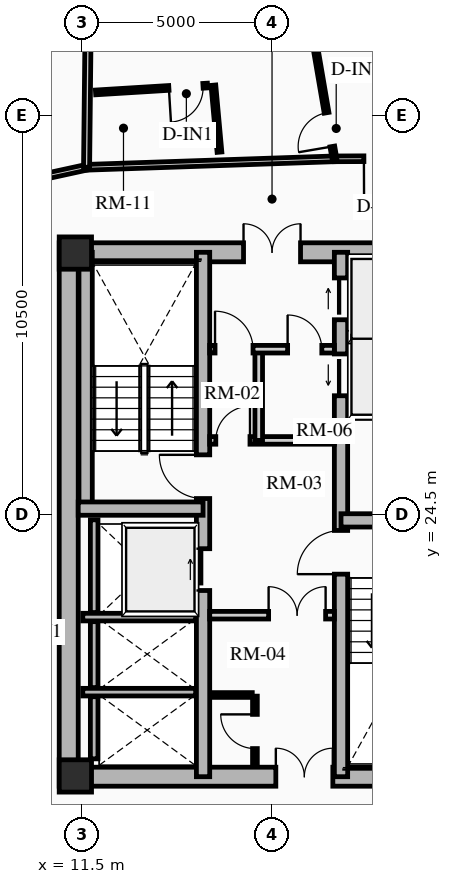
"""IFC4 building model, lengths in metres.
Left out: names, types, materials, properties, quantities, classifications, styles, units other than length and angle.
Written with IfcOpenShell. Run it as: python <this file> out.ifc"""

import sys

from ifc_helpers import new_model, si_unit, direction, frame, frame_2d, origin, origin_2d, place, context, subcontext, project, spatial, rectangle, extrude, source, transform, mapped, element, fill, save


model = new_model("IFC4")
c1 = context("Model", 3, precision=1e-05, world=origin(), true_north=direction((0.0, 1.0)))
c2 = subcontext(c1, "Body", "Model", "MODEL_VIEW")
j1 = project(units=[si_unit("LENGTHUNIT", "METRE"), si_unit("PLANEANGLEUNIT", "RADIAN")], contexts=[c1])
p1 = place(None, origin())
s1 = spatial("IfcSite", under=j1, at=p1, CompositionType="ELEMENT")
p2 = place(p1, origin())
s2 = spatial("IfcBuilding", under=s1, at=p2, CompositionType="ELEMENT")
p3 = place(p2, frame((0.0, 0.0, 39.46)))
s3 = spatial("IfcBuildingStorey", under=s2, at=p3, CompositionType="ELEMENT", Elevation=39.46)
p4 = place(p3, frame((11.15, 17.35, 0.0), z_axis=(0.0, 0.0, 1.0), x_axis=(0.0, 1.0, 0.0)))
e1 = element("IfcWall", 1, at=p4, inside=s3, PredefinedType="SHEAR", context=c2, shape_type="SweptSolid", body=[
    extrude(rectangle(XDim=14.3, YDim=0.5, at=frame_2d((7.15, 0.0))), origin(), (0.0, 0.0, 1.0), 2.91),
])
p5 = place(p3, frame((11.15, 17.6, 0.0), z_axis=(0.0, 0.0, 1.0), x_axis=(1.0, 0.0, 0.0)))
e2 = element("IfcWall", 2, at=p5, inside=s3, PredefinedType="SHEAR", context=c2, shape_type="SweptSolid", body=[
    extrude(rectangle(XDim=10.7, YDim=0.5, at=frame_2d((5.35, 0.0))), origin(), (0.0, 0.0, 1.0), 2.91),
])
m1 = source(origin(), c2, "Body", "SweptSolid", [
    extrude(rectangle(XDim=1.5, YDim=2.02, at=frame_2d((0.75, 1.01))), frame((0.0, 0.26, 0.0), z_axis=(0.0, -1.0, 0.0), x_axis=(1.0, 0.0, 0.0)), (0.0, 0.0, 1.0), 0.52),
])
p6 = place(p5, frame((5.45, 0.0, 0.0)))
e3 = element("IfcOpeningElement", 3, at=p6, cuts=e2, PredefinedType="OPENING", context=c2, shape_type="MappedRepresentation", body=[
    mapped(m1, transform((0.0, 0.0, 0.0), x_axis=(1.0, 0.0, 0.0), y_axis=(0.0, 1.0, 0.0), z_axis=(0.0, 0.0, 1.0), scale=1.0)),
])
p7 = place(p3, frame((11.15, 31.4, 0.0), z_axis=(0.0, 0.0, 1.0), x_axis=(1.0, 0.0, 0.0)))
e4 = element("IfcWall", 4, at=p7, inside=s3, PredefinedType="SHEAR", context=c2, shape_type="SweptSolid", body=[
    extrude(rectangle(XDim=10.7, YDim=0.5, at=frame_2d((5.35, 0.0))), origin(), (0.0, 0.0, 1.0), 2.91),
])
p8 = place(p7, frame((4.6, 0.0, 0.0)))
e5 = element("IfcOpeningElement", 5, at=p8, cuts=e4, PredefinedType="OPENING", context=c2, shape_type="MappedRepresentation", body=[
    mapped(m1, transform((0.0, 0.0, 0.0), x_axis=(1.0, 0.0, 0.0), y_axis=(0.0, 1.0, 0.0), z_axis=(0.0, 0.0, 1.0), scale=1.0)),
])
p9 = place(p3, frame((14.685, 17.6, 0.0), z_axis=(0.0, 0.0, 1.0), x_axis=(0.0, 1.0, 0.0)))
e6 = element("IfcWall", 6, at=p9, inside=s3, PredefinedType="SHEAR", context=c2, shape_type="SweptSolid", body=[
    extrude(rectangle(XDim=13.8, YDim=0.35, at=frame_2d((6.9, 0.0))), origin(), (0.0, 0.0, 1.0), 2.91),
])
m2 = source(origin(), c2, "Body", "SweptSolid", [
    extrude(rectangle(XDim=1.1, YDim=2.015, at=frame_2d((0.55, 1.007))), frame((0.0, 0.185, 0.0), z_axis=(0.0, -1.0, 0.0), x_axis=(1.0, 0.0, 0.0)), (0.0, 0.0, 1.0), 0.37),
])
p10 = place(p9, frame((4.9, 0.0, 0.0)))
e7 = element("IfcOpeningElement", 7, at=p10, cuts=e6, PredefinedType="OPENING", context=c2, shape_type="MappedRepresentation", body=[
    mapped(m2, transform((0.0, 0.0, 0.0), x_axis=(1.0, 0.0, 0.0), y_axis=(0.0, 1.0, 0.0), z_axis=(0.0, 0.0, 1.0), scale=1.0)),
])
m3 = source(origin(), c2, "Body", "SweptSolid", [
    extrude(rectangle(XDim=1.15, YDim=2.02, at=frame_2d((0.575, 1.01))), frame((0.0, 0.185, 0.0), z_axis=(0.0, -1.0, 0.0), x_axis=(1.0, 0.0, 0.0)), (0.0, 0.0, 1.0), 0.37),
])
p11 = place(p9, frame((7.32, 0.0, 0.0)))
e8 = element("IfcOpeningElement", 8, at=p11, cuts=e6, PredefinedType="OPENING", context=c2, shape_type="MappedRepresentation", body=[
    mapped(m3, transform((0.0, 0.0, 0.0), x_axis=(1.0, 0.0, 0.0), y_axis=(0.0, 1.0, 0.0), z_axis=(0.0, 0.0, 1.0), scale=1.0)),
])
p12 = place(p3, frame((18.315, 17.6, 0.0), z_axis=(0.0, 0.0, 1.0), x_axis=(0.0, 1.0, 0.0)))
e9 = element("IfcWall", 9, at=p12, inside=s3, PredefinedType="SHEAR", context=c2, shape_type="SweptSolid", body=[
    extrude(rectangle(XDim=13.8, YDim=0.35, at=frame_2d((6.9, 0.0))), origin(), (0.0, 0.0, 1.0), 2.91),
])
p13 = place(p12, frame((10.025, 0.0, 0.0)))
e10 = element("IfcOpeningElement", 10, at=p13, cuts=e9, PredefinedType="OPENING", context=c2, shape_type="MappedRepresentation", body=[
    mapped(m2, transform((0.0, 0.0, 0.0), x_axis=(1.0, 0.0, 0.0), y_axis=(0.0, 1.0, 0.0), z_axis=(0.0, 0.0, 1.0), scale=1.0)),
])
p14 = place(p12, frame((12.025, 0.0, 0.0)))
e11 = element("IfcOpeningElement", 11, at=p14, cuts=e9, PredefinedType="OPENING", context=c2, shape_type="MappedRepresentation", body=[
    mapped(m2, transform((0.0, 0.0, 0.0), x_axis=(1.0, 0.0, 0.0), y_axis=(0.0, 1.0, 0.0), z_axis=(0.0, 0.0, 1.0), scale=1.0)),
])
p15 = place(p12, frame((5.33, 0.0, 0.0)))
e12 = element("IfcOpeningElement", 12, at=p15, cuts=e9, PredefinedType="OPENING", context=c2, shape_type="MappedRepresentation", body=[
    mapped(m3, transform((0.0, 0.0, 0.0), x_axis=(1.0, 0.0, 0.0), y_axis=(0.0, 1.0, 0.0), z_axis=(0.0, 0.0, 1.0), scale=1.0)),
])
p16 = place(p3, frame((11.595, 24.655, 0.0), z_axis=(0.0, 0.0, 1.0), x_axis=(0.0, 1.0, 0.0)))
e13 = element("IfcWall", 13, at=p16, inside=s3, PredefinedType="SHEAR", context=c2, shape_type="SweptSolid", body=[
    extrude(rectangle(XDim=6.745, YDim=0.35, at=frame_2d((3.373, 0.0))), origin(), (0.0, 0.0, 1.0), 2.91),
])
for number, where, z_axis, x_axis in (
    (14, (11.4, 24.655, 0.0), (0.0, 0.0, 1.0), (1.0, 0.0, 0.0)),
    (15, (18.315, 24.345, 0.0), (0.0, 0.0, 1.0), (1.0, 0.0, 0.0)),
):
    element("IfcWall", number, at=place(p3, frame(where, z_axis=z_axis, x_axis=x_axis)), inside=s3, PredefinedType="SHEAR", context=c2, shape_type="SweptSolid", body=[
        extrude(rectangle(XDim=3.285, YDim=0.35, at=frame_2d((1.643, 0.0))), origin(), (0.0, 0.0, 1.0), 2.91),
    ])
for number, where, z_axis, x_axis in (
    (16, (11.325, 17.62, 0.0), (0.0, 0.0, 1.0), (1.0, 0.0, 0.0)),
    (17, (11.325, 31.38, 0.0), (0.0, 0.0, 1.0), (1.0, 0.0, 0.0)),
):
    element("IfcColumn", number, at=place(p3, frame(where, z_axis=z_axis, x_axis=x_axis)), inside=s3, PredefinedType="COLUMN", context=c2, shape_type="SweptSolid", body=[
        extrude(rectangle(XDim=0.85, YDim=0.85, at=origin_2d()), origin(), (0.0, 0.0, 1.0), 2.91),
    ])
p17 = place(p3, frame((11.52, 21.8, 0.0), z_axis=(0.0, 0.0, 1.0), x_axis=(1.0, 0.0, 0.0)))
e18 = element("IfcWall", 18, at=p17, inside=s3, PredefinedType="SHEAR", context=c2, shape_type="SweptSolid", body=[
    extrude(rectangle(XDim=2.97, YDim=0.2, at=frame_2d((1.485, 0.0))), origin(), (0.0, 0.0, 1.0), 2.91),
])
p18 = place(p3, frame((11.82, 21.92, 0.0), z_axis=(0.0, 0.0, 1.0), x_axis=(0.0, 1.0, 0.0)))
e19 = element("IfcWall", 19, at=p18, inside=s3, PredefinedType="SHEAR", context=c2, shape_type="SweptSolid", body=[
    extrude(rectangle(XDim=2.44, YDim=0.2, at=frame_2d((1.22, 0.0))), origin(), (0.0, 0.0, 1.0), 2.91),
])
p19 = place(p3, frame((11.52, 19.825, 0.0), z_axis=(0.0, 0.0, 1.0), x_axis=(1.0, 0.0, 0.0)))
e20 = element("IfcWall", 20, at=p19, inside=s3, PredefinedType="SHEAR", context=c2, shape_type="SweptSolid", body=[
    extrude(rectangle(XDim=2.97, YDim=0.2, at=frame_2d((1.485, 0.0))), origin(), (0.0, 0.0, 1.0), 2.91),
])
p20 = place(p3, frame((11.82, 19.945, 0.0), z_axis=(0.0, 0.0, 1.0), x_axis=(0.0, 1.0, 0.0)))
e21 = element("IfcWall", 21, at=p20, inside=s3, PredefinedType="SHEAR", context=c2, shape_type="SweptSolid", body=[
    extrude(rectangle(XDim=1.735, YDim=0.2, at=frame_2d((0.867, 0.0))), origin(), (0.0, 0.0, 1.0), 2.91),
])
p21 = place(p3, frame((11.82, 18.07, 0.0), z_axis=(0.0, 0.0, 1.0), x_axis=(0.0, 1.0, 0.0)))
e22 = element("IfcWall", 22, at=p21, inside=s3, PredefinedType="SHEAR", context=c2, shape_type="SweptSolid", body=[
    extrude(rectangle(XDim=1.635, YDim=0.2, at=frame_2d((0.817, 0.0))), origin(), (0.0, 0.0, 1.0), 2.91),
])
for number, where, z_axis, x_axis in (
    (23, (18.51, 27.13, 0.0), (0.0, 0.0, 1.0), (1.0, 0.0, 0.0)),
    (24, (18.51, 29.175, 0.0), (0.0, 0.0, 1.0), (1.0, 0.0, 0.0)),
):
    element("IfcWall", number, at=place(p3, frame(where, z_axis=z_axis, x_axis=x_axis)), inside=s3, PredefinedType="SHEAR", context=c2, shape_type="SweptSolid", body=[
        extrude(rectangle(XDim=2.97, YDim=0.2, at=frame_2d((1.485, 0.0))), origin(), (0.0, 0.0, 1.0), 2.91),
    ])
p22 = place(p3, frame((14.86, 21.85, 0.0), z_axis=(0.0, 0.0, 1.0), x_axis=(1.0, 0.0, 0.0)))
e25 = element("IfcWall", 25, at=p22, inside=s3, PredefinedType="PARTITIONING", context=c2, shape_type="SweptSolid", body=[
    extrude(rectangle(XDim=3.28, YDim=0.2, at=frame_2d((1.64, 0.0))), origin(), (0.0, 0.0, 1.0), 2.635),
])
m4 = source(origin(), c2, "Body", "SweptSolid", [
    extrude(rectangle(XDim=1.5, YDim=2.02, at=frame_2d((0.75, 1.01))), frame((0.0, 0.11, 0.0), z_axis=(0.0, -1.0, 0.0), x_axis=(1.0, 0.0, 0.0)), (0.0, 0.0, 1.0), 0.22),
])
p23 = place(p22, frame((1.55, 0.0, 0.0)))
e26 = element("IfcOpeningElement", 26, at=p23, cuts=e25, PredefinedType="OPENING", context=c2, shape_type="MappedRepresentation", body=[
    mapped(m4, transform((0.0, 0.0, 0.0), x_axis=(1.0, 0.0, 0.0), y_axis=(0.0, 1.0, 0.0), z_axis=(0.0, 0.0, 1.0), scale=1.0)),
])
p24 = place(p3, frame((14.86, 26.45, 0.0), z_axis=(0.0, 0.0, 1.0), x_axis=(1.0, 0.0, 0.0)))
e27 = element("IfcWall", 27, at=p24, inside=s3, PredefinedType="PARTITIONING", context=c2, shape_type="SweptSolid", body=[
    extrude(rectangle(XDim=3.28, YDim=0.2, at=frame_2d((1.64, 0.0))), origin(), (0.0, 0.0, 1.0), 2.635),
])
m5 = source(origin(), c2, "Body", "SweptSolid", [
    extrude(rectangle(XDim=0.9, YDim=2.005, at=frame_2d((0.45, 1.002))), frame((0.0, 0.11, 0.0), z_axis=(0.0, -1.0, 0.0), x_axis=(1.0, 0.0, 0.0)), (0.0, 0.0, 1.0), 0.22),
])
p25 = place(p24, frame((0.16, 0.0, 0.0)))
e28 = element("IfcOpeningElement", 28, at=p25, cuts=e27, PredefinedType="OPENING", context=c2, shape_type="MappedRepresentation", body=[
    mapped(m5, transform((0.0, 0.0, 0.0), x_axis=(1.0, 0.0, 0.0), y_axis=(0.0, 1.0, 0.0), z_axis=(0.0, 0.0, 1.0), scale=1.0)),
])
p26 = place(p3, frame((16.15, 26.45, 0.0), z_axis=(0.0, 0.0, 1.0), x_axis=(0.0, 1.0, 0.0)))
e29 = element("IfcWall", 29, at=p26, inside=s3, PredefinedType="PARTITIONING", context=c2, shape_type="SweptSolid", body=[
    extrude(rectangle(XDim=2.4, YDim=0.2, at=frame_2d((1.2, 0.0))), origin(), (0.0, 0.0, 1.0), 2.635),
])
p27 = place(p3, frame((14.86, 28.85, 0.0), z_axis=(0.0, 0.0, 1.0), x_axis=(1.0, 0.0, 0.0)))
e30 = element("IfcWall", 30, at=p27, inside=s3, PredefinedType="PARTITIONING", context=c2, shape_type="SweptSolid", body=[
    extrude(rectangle(XDim=3.28, YDim=0.2, at=frame_2d((1.64, 0.0))), origin(), (0.0, 0.0, 1.0), 2.635),
])
m6 = source(origin(), c2, "Body", "SweptSolid", [
    extrude(rectangle(XDim=1.0, YDim=2.015, at=frame_2d((0.5, 1.007))), frame((0.0, 0.11, 0.0), z_axis=(0.0, -1.0, 0.0), x_axis=(1.0, 0.0, 0.0)), (0.0, 0.0, 1.0), 0.22),
])
p28 = place(p27, frame((0.14, 0.0, 0.0)))
e31 = element("IfcOpeningElement", 31, at=p28, cuts=e30, PredefinedType="OPENING", context=c2, shape_type="MappedRepresentation", body=[
    mapped(m6, transform((0.0, 0.0, 0.0), x_axis=(1.0, 0.0, 0.0), y_axis=(0.0, 1.0, 0.0), z_axis=(0.0, 0.0, 1.0), scale=1.0)),
])
p29 = place(p27, frame((2.05, 0.0, 0.0)))
e32 = element("IfcOpeningElement", 32, at=p29, cuts=e30, PredefinedType="OPENING", context=c2, shape_type="MappedRepresentation", body=[
    mapped(m5, transform((0.0, 0.0, 0.0), x_axis=(1.0, 0.0, 0.0), y_axis=(0.0, 1.0, 0.0), z_axis=(0.0, 0.0, 1.0), scale=1.0)),
])
p30 = place(p3, frame((16.05, 17.92, 0.0), z_axis=(0.0, 0.0, 1.0), x_axis=(0.0, 1.0, 0.0)))
e33 = element("IfcWall", 33, at=p30, inside=s3, PredefinedType="PARTITIONING", context=c2, shape_type="SweptSolid", body=[
    extrude(rectangle(XDim=1.8, YDim=0.125, at=frame_2d((0.9, 0.0))), origin(), (0.0, 0.0, 1.0), 2.635),
])
m7 = source(origin(), c2, "Body", "SweptSolid", [
    extrude(rectangle(XDim=0.9, YDim=2.005, at=frame_2d((0.45, 1.002))), frame((0.0, 0.073, 0.0), z_axis=(0.0, -1.0, 0.0), x_axis=(1.0, 0.0, 0.0)), (0.0, 0.0, 1.0), 0.145),
])
p31 = place(p30, frame((0.42, 0.0, 0.0)))
e34 = element("IfcOpeningElement", 34, at=p31, cuts=e33, PredefinedType="OPENING", context=c2, shape_type="MappedRepresentation", body=[
    mapped(m7, transform((0.0, 0.0, 0.0), x_axis=(1.0, 0.0, 0.0), y_axis=(0.0, 1.0, 0.0), z_axis=(0.0, 0.0, 1.0), scale=1.0)),
])
p32 = place(p3, frame((14.88, 19.75, 0.0), z_axis=(0.0, 0.0, 1.0), x_axis=(1.0, 0.0, 0.0)))
e35 = element("IfcWall", 35, at=p32, inside=s3, PredefinedType="PARTITIONING", context=c2, shape_type="SweptSolid", body=[
    extrude(rectangle(XDim=1.1, YDim=0.125, at=frame_2d((0.55, 0.0))), origin(), (0.0, 0.0, 1.0), 2.635),
])
p33 = place(p3, frame((21.527, 33.873, 0.0), z_axis=(0.0, 0.0, 1.0), x_axis=(-0.999991838845, -0.004040079574, 0.0)))
e36 = element("IfcWall", 36, at=p33, inside=s3, PredefinedType="PARTITIONING", context=c2, shape_type="SweptSolid", body=[
    extrude(rectangle(XDim=3.384, YDim=0.15, at=frame_2d((1.692, 0.0))), origin(), (0.0, 0.0, 1.0), 2.159),
])
m8 = source(origin(), c2, "Body", "SweptSolid", [
    extrude(rectangle(XDim=1.05, YDim=2.015, at=frame_2d((0.525, 1.007))), frame((0.0, 0.085, 0.0), z_axis=(0.0, -1.0, 0.0), x_axis=(1.0, 0.0, 0.0)), (0.0, 0.0, 1.0), 0.17),
])
p34 = place(p33, frame((1.56, 0.0, 0.0)))
e37 = element("IfcOpeningElement", 37, at=p34, cuts=e36, PredefinedType="OPENING", context=c2, shape_type="MappedRepresentation", body=[
    mapped(m8, transform((0.0, 0.0, 0.0), x_axis=(1.0, 0.0, 0.0), y_axis=(0.0, 1.0, 0.0), z_axis=(0.0, 0.0, 1.0), scale=1.0)),
])
p35 = place(p3, frame((18.143, 33.86, 0.0), z_axis=(0.0, 0.0, 1.0), x_axis=(-0.999419208319, -0.034077060363, 0.0)))
e38 = element("IfcWall", 38, at=p35, inside=s3, PredefinedType="PARTITIONING", context=c2, shape_type="SweptSolid", body=[
    extrude(rectangle(XDim=6.527, YDim=0.15, at=frame_2d((3.263, 0.0))), origin(), (0.0, 0.0, 1.0), 2.159),
])
p36 = place(p3, frame((11.62, 33.637, 0.0), z_axis=(0.0, 0.0, 1.0), x_axis=(-0.97702579435, -0.213121085711, 0.0)))
e39 = element("IfcWall", 39, at=p36, inside=s3, PredefinedType="PARTITIONING", context=c2, shape_type="SweptSolid", body=[
    extrude(rectangle(XDim=1.935, YDim=0.15, at=frame_2d((0.967, 0.0))), origin(), (0.0, 0.0, 1.0), 2.159),
])
p37 = place(p3, frame((11.62, 33.637, 0.0), z_axis=(0.0, 0.0, 1.0), x_axis=(0.01090774254, 0.999940508807, 0.0)))
e40 = element("IfcWall", 40, at=p37, inside=s3, PredefinedType="PARTITIONING", context=c2, shape_type="SweptSolid", body=[
    extrude(rectangle(XDim=8.886, YDim=0.16, at=frame_2d((4.443, 0.0))), origin(), (0.0, 0.0, 1.0), 2.073),
])
p38 = place(p3, frame((18.143, 33.86, 0.0), z_axis=(0.0, 0.0, 1.0), x_axis=(-0.168840545196, 0.985643378864, 0.0)))
e41 = element("IfcWall", 41, at=p38, inside=s3, PredefinedType="PARTITIONING", context=c2, shape_type="SweptSolid", body=[
    extrude(rectangle(XDim=9.73, YDim=0.125, at=frame_2d((4.865, 0.0))), origin(), (0.0, 0.0, 1.0), 2.073),
])
p39 = place(p38, frame((0.33, 0.0, 0.0)))
e42 = element("IfcOpeningElement", 42, at=p39, cuts=e41, PredefinedType="OPENING", context=c2, shape_type="MappedRepresentation", body=[
    mapped(m7, transform((0.0, 0.0, 0.0), x_axis=(1.0, 0.0, 0.0), y_axis=(0.0, 1.0, 0.0), z_axis=(0.0, 0.0, 1.0), scale=1.0)),
])
p40 = place(p3, frame((15.117, 34.035, 0.0), z_axis=(0.0, 0.0, 1.0), x_axis=(-0.090498430303, 0.995896598103, 0.0)))
e43 = element("IfcWall", 43, at=p40, inside=s3, PredefinedType="PARTITIONING", context=c2, shape_type="SweptSolid", body=[
    extrude(rectangle(XDim=1.77, YDim=0.125, at=frame_2d((0.885, 0.0))), origin(), (0.0, 0.0, 1.0), 2.635),
])
p41 = place(p3, frame((14.803, 35.788, 0.0), z_axis=(0.0, 0.0, 1.0), x_axis=(-0.998116078946, -0.06135383403, 0.0)))
e44 = element("IfcWall", 44, at=p41, inside=s3, PredefinedType="PARTITIONING", context=c2, shape_type="SweptSolid", body=[
    extrude(rectangle(XDim=2.953, YDim=0.125, at=frame_2d((1.476, 0.0))), origin(), (0.0, 0.0, 1.0), 2.159),
])
p42 = place(p41, frame((0.12, 0.0, 0.0)))
e45 = element("IfcOpeningElement", 45, at=p42, cuts=e44, PredefinedType="OPENING", context=c2, shape_type="MappedRepresentation", body=[
    mapped(m7, transform((0.0, 0.0, 0.0), x_axis=(1.0, 0.0, 0.0), y_axis=(0.0, 1.0, 0.0), z_axis=(0.0, 0.0, 1.0), scale=1.0)),
])
m9 = source(origin(), c2, "Body", "SweptSolid", [
    extrude(rectangle(XDim=1.1, YDim=2.015, at=frame_2d((0.55, 1.007))), frame((0.0, 0.025, 0.0), z_axis=(0.0, -1.0, 0.0), x_axis=(1.0, 0.0, 0.0)), (0.0, 0.0, 1.0), 0.05),
])
p43 = place(p10, origin())
e46 = element("IfcDoor", 46, at=p43, inside=s3, OperationType="SLIDING_TO_RIGHT", PredefinedType="DOOR", context=c2, shape_type="MappedRepresentation", body=[
    mapped(m9, transform((0.0, 0.0, 0.0), x_axis=(1.0, 0.0, 0.0), y_axis=(0.0, 1.0, 0.0), z_axis=(0.0, 0.0, 1.0), scale=1.0)),
])
fill(e7, e46)
p44 = place(p13, origin())
e47 = element("IfcDoor", 47, at=p44, inside=s3, OperationType="SLIDING_TO_LEFT", PredefinedType="DOOR", context=c2, shape_type="MappedRepresentation", body=[
    mapped(m9, transform((0.0, 0.0, 0.0), x_axis=(1.0, 0.0, 0.0), y_axis=(0.0, 1.0, 0.0), z_axis=(0.0, 0.0, 1.0), scale=1.0)),
])
fill(e10, e47)
p45 = place(p14, origin())
e48 = element("IfcDoor", 48, at=p45, inside=s3, OperationType="SLIDING_TO_RIGHT", PredefinedType="DOOR", context=c2, shape_type="MappedRepresentation", body=[
    mapped(m9, transform((0.0, 0.0, 0.0), x_axis=(1.0, 0.0, 0.0), y_axis=(0.0, 1.0, 0.0), z_axis=(0.0, 0.0, 1.0), scale=1.0)),
])
fill(e11, e48)
m10 = source(origin(), c2, "Body", "SweptSolid", [
    extrude(rectangle(XDim=1.15, YDim=2.02, at=frame_2d((0.575, 1.01))), frame((0.0, 0.025, 0.0), z_axis=(0.0, -1.0, 0.0), x_axis=(1.0, 0.0, 0.0)), (0.0, 0.0, 1.0), 0.05),
])
p46 = place(p11, origin())
e49 = element("IfcDoor", 49, at=p46, inside=s3, OperationType="SINGLE_SWING_RIGHT", PredefinedType="DOOR", context=c2, shape_type="MappedRepresentation", body=[
    mapped(m10, transform((0.0, 0.0, 0.0), x_axis=(1.0, 0.0, 0.0), y_axis=(0.0, 1.0, 0.0), z_axis=(0.0, 0.0, 1.0), scale=1.0)),
])
fill(e8, e49)
p47 = place(p15, origin())
e50 = element("IfcDoor", 50, at=p47, inside=s3, OperationType="SINGLE_SWING_LEFT", PredefinedType="DOOR", context=c2, shape_type="MappedRepresentation", body=[
    mapped(m10, transform((0.0, 0.0, 0.0), x_axis=(1.0, 0.0, 0.0), y_axis=(0.0, 1.0, 0.0), z_axis=(0.0, 0.0, 1.0), scale=1.0)),
])
fill(e12, e50)
m11 = source(origin(), c2, "Body", "SweptSolid", [
    extrude(rectangle(XDim=1.5, YDim=2.02, at=frame_2d((0.75, 1.01))), frame((0.0, 0.025, 0.0), z_axis=(0.0, -1.0, 0.0), x_axis=(1.0, 0.0, 0.0)), (0.0, 0.0, 1.0), 0.05),
])
p48 = place(p8, origin())
e51 = element("IfcDoor", 51, at=p48, inside=s3, OperationType="DOUBLE_DOOR_SINGLE_SWING", PredefinedType="DOOR", context=c2, shape_type="MappedRepresentation", body=[
    mapped(m11, transform((0.0, 0.0, 0.0), x_axis=(1.0, 0.0, 0.0), y_axis=(0.0, 1.0, 0.0), z_axis=(0.0, 0.0, 1.0), scale=1.0)),
])
fill(e5, e51)
p49 = place(p6, origin())
e52 = element("IfcDoor", 52, at=p49, inside=s3, OperationType="DOUBLE_DOOR_SINGLE_SWING", PredefinedType="DOOR", context=c2, shape_type="MappedRepresentation", body=[
    mapped(m11, transform((0.0, 0.0, 0.0), x_axis=(1.0, 0.0, 0.0), y_axis=(0.0, 1.0, 0.0), z_axis=(0.0, 0.0, 1.0), scale=1.0)),
])
fill(e3, e52)
p50 = place(p23, origin())
e53 = element("IfcDoor", 53, at=p50, inside=s3, OperationType="DOUBLE_DOOR_SINGLE_SWING", PredefinedType="DOOR", context=c2, shape_type="MappedRepresentation", body=[
    mapped(m11, transform((0.0, 0.0, 0.0), x_axis=(1.0, 0.0, 0.0), y_axis=(0.0, 1.0, 0.0), z_axis=(0.0, 0.0, 1.0), scale=1.0)),
])
fill(e26, e53)
m12 = source(origin(), c2, "Body", "SweptSolid", [
    extrude(rectangle(XDim=0.9, YDim=2.005, at=frame_2d((0.45, 1.002))), frame((0.0, 0.025, 0.0), z_axis=(0.0, -1.0, 0.0), x_axis=(1.0, 0.0, 0.0)), (0.0, 0.0, 1.0), 0.05),
])
p51 = place(p25, origin())
e54 = element("IfcDoor", 54, at=p51, inside=s3, OperationType="SINGLE_SWING_RIGHT", PredefinedType="DOOR", context=c2, shape_type="MappedRepresentation", body=[
    mapped(m12, transform((0.0, 0.0, 0.0), x_axis=(1.0, 0.0, 0.0), y_axis=(0.0, 1.0, 0.0), z_axis=(0.0, 0.0, 1.0), scale=1.0)),
])
fill(e28, e54)
m13 = source(origin(), c2, "Body", "SweptSolid", [
    extrude(rectangle(XDim=1.0, YDim=2.015, at=frame_2d((0.5, 1.007))), frame((0.0, 0.025, 0.0), z_axis=(0.0, -1.0, 0.0), x_axis=(1.0, 0.0, 0.0)), (0.0, 0.0, 1.0), 0.05),
])
p52 = place(p28, origin())
e55 = element("IfcDoor", 55, at=p52, inside=s3, OperationType="SINGLE_SWING_LEFT", PredefinedType="DOOR", context=c2, shape_type="MappedRepresentation", body=[
    mapped(m13, transform((0.0, 0.0, 0.0), x_axis=(1.0, 0.0, 0.0), y_axis=(0.0, 1.0, 0.0), z_axis=(0.0, 0.0, 1.0), scale=1.0)),
])
fill(e31, e55)
p53 = place(p31, origin())
e56 = element("IfcDoor", 56, at=p53, inside=s3, OperationType="SINGLE_SWING_RIGHT", PredefinedType="DOOR", context=c2, shape_type="MappedRepresentation", body=[
    mapped(m12, transform((0.0, 0.0, 0.0), x_axis=(1.0, 0.0, 0.0), y_axis=(0.0, 1.0, 0.0), z_axis=(0.0, 0.0, 1.0), scale=1.0)),
])
fill(e34, e56)
p54 = place(p29, origin())
e57 = element("IfcDoor", 57, at=p54, inside=s3, OperationType="SINGLE_SWING_LEFT", PredefinedType="DOOR", context=c2, shape_type="MappedRepresentation", body=[
    mapped(m12, transform((0.0, 0.0, 0.0), x_axis=(1.0, 0.0, 0.0), y_axis=(0.0, 1.0, 0.0), z_axis=(0.0, 0.0, 1.0), scale=1.0)),
])
fill(e32, e57)
m14 = source(origin(), c2, "Body", "SweptSolid", [
    extrude(rectangle(XDim=1.05, YDim=2.015, at=frame_2d((0.525, 1.007))), frame((0.0, 0.025, 0.0), z_axis=(0.0, -1.0, 0.0), x_axis=(1.0, 0.0, 0.0)), (0.0, 0.0, 1.0), 0.05),
])
p55 = place(p34, origin())
e58 = element("IfcDoor", 58, at=p55, inside=s3, OperationType="SINGLE_SWING_RIGHT", PredefinedType="DOOR", context=c2, shape_type="MappedRepresentation", body=[
    mapped(m14, transform((0.0, 0.0, 0.0), x_axis=(1.0, 0.0, 0.0), y_axis=(0.0, 1.0, 0.0), z_axis=(0.0, 0.0, 1.0), scale=1.0)),
])
fill(e37, e58)
p56 = place(p39, origin())
e59 = element("IfcDoor", 59, at=p56, inside=s3, OperationType="SINGLE_SWING_LEFT", PredefinedType="DOOR", context=c2, shape_type="MappedRepresentation", body=[
    mapped(m12, transform((0.0, 0.0, 0.0), x_axis=(1.0, 0.0, 0.0), y_axis=(0.0, 1.0, 0.0), z_axis=(0.0, 0.0, 1.0), scale=1.0)),
])
fill(e42, e59)
p57 = place(p42, origin())
e60 = element("IfcDoor", 60, at=p57, inside=s3, OperationType="SINGLE_SWING_RIGHT", PredefinedType="DOOR", context=c2, shape_type="MappedRepresentation", body=[
    mapped(m12, transform((0.0, 0.0, 0.0), x_axis=(1.0, 0.0, 0.0), y_axis=(0.0, 1.0, 0.0), z_axis=(0.0, 0.0, 1.0), scale=1.0)),
])
fill(e45, e60)
save(model, sys.argv[1])
